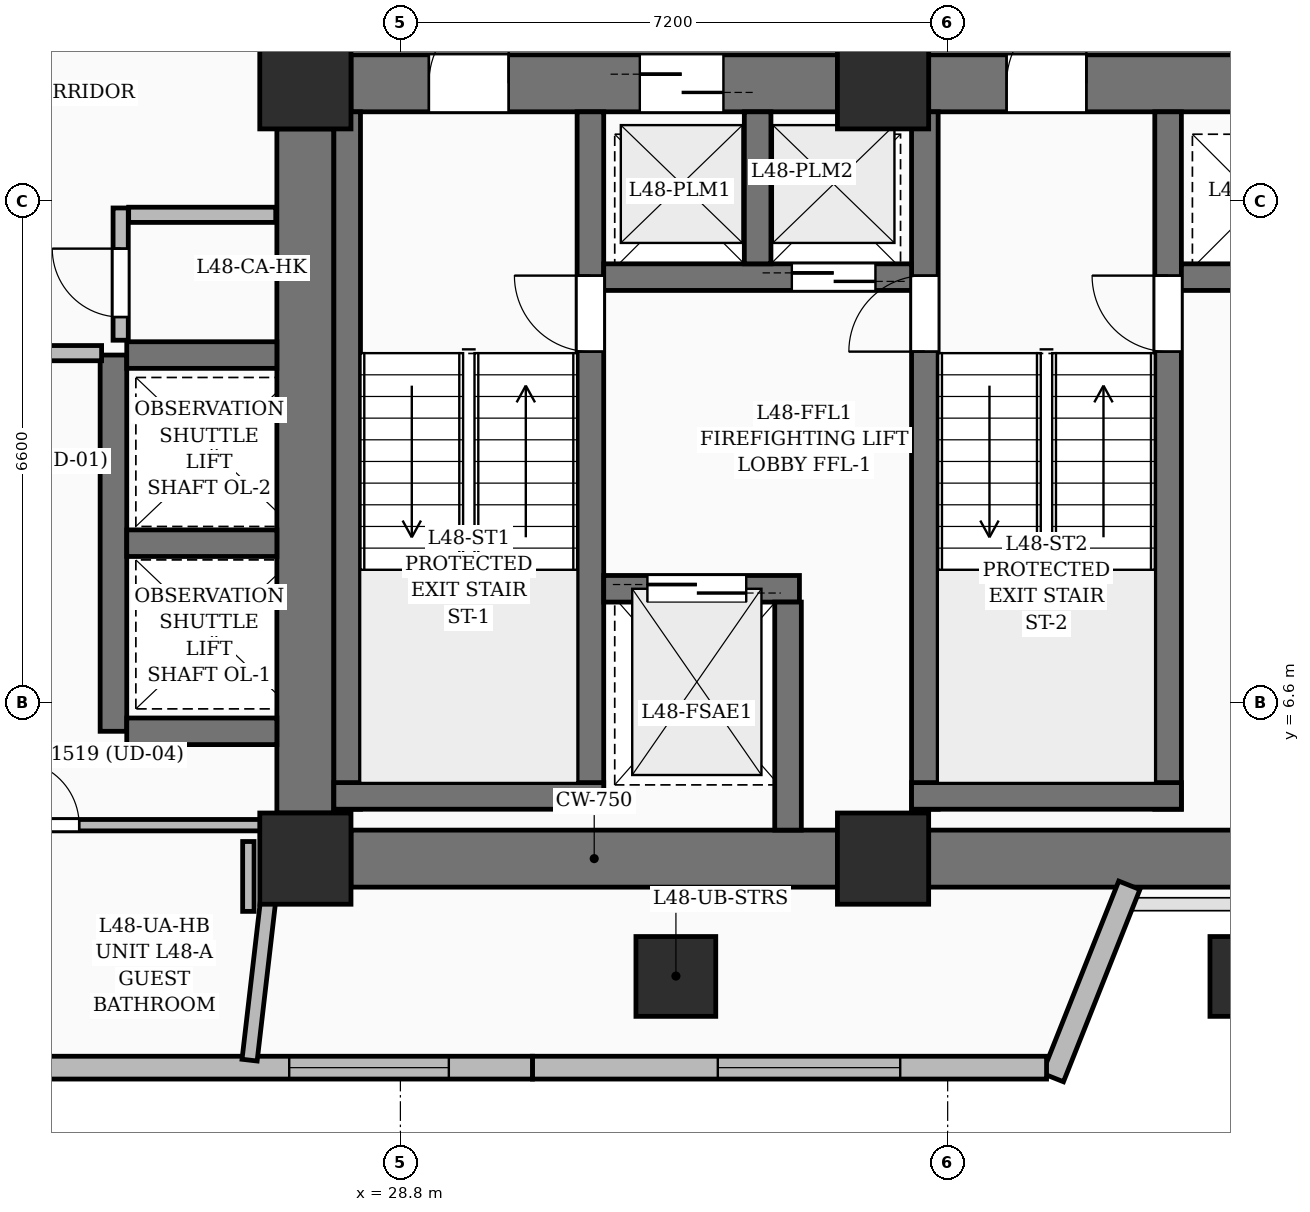
"""IFC4 building model, lengths in metres.
Left out: names, types, materials, properties, quantities, classifications, styles, units other than length and angle.
Written with IfcOpenShell. Run it as: python <this file> out.ifc"""

import sys

from ifc_helpers import new_model, si_unit, direction, frame, frame_2d, origin, origin_2d, place, context, subcontext, project, spatial, rectangle, extrude, element, fill, save


model = new_model("IFC4")
c1 = context("Model", 3, precision=1e-05, world=origin(), true_north=direction((0.0, 1.0)))
c2 = subcontext(c1, "Body", "Model", "MODEL_VIEW")
j1 = project(units=[si_unit("LENGTHUNIT", "METRE"), si_unit("PLANEANGLEUNIT", "RADIAN")], contexts=[c1])
p1 = place(None, origin())
s1 = spatial("IfcSite", under=j1, at=p1, CompositionType="ELEMENT")
p2 = place(p1, origin())
s2 = spatial("IfcBuilding", under=s1, at=p2, CompositionType="ELEMENT")
p3 = place(p2, frame((0.0, 0.0, 186.0)))
s3 = spatial("IfcBuildingStorey", under=s2, at=p3, CompositionType="ELEMENT", Elevation=186.0)
for number, where, z_axis, x_axis in (
    (1, (27.55, 4.55, 0.0), (0.0, 0.0, 1.0), (1.0, 0.0, 0.0)),
    (2, (35.15, 4.55, 0.0), (0.0, 0.0, 1.0), (1.0, 0.0, 0.0)),
    (3, (27.55, 14.75, 0.0), (0.0, 0.0, 1.0), (1.0, 0.0, 0.0)),
    (4, (35.15, 14.75, 0.0), (0.0, 0.0, 1.0), (1.0, 0.0, 0.0)),
):
    element("IfcColumn", number, at=place(p3, frame(where, z_axis=z_axis, x_axis=x_axis)), inside=s3, PredefinedType="COLUMN", context=c2, shape_type="SweptSolid", body=[
        extrude(rectangle(XDim=1.2, YDim=1.2, at=origin_2d()), origin(), (0.0, 0.0, 1.0), 3.6),
    ])
p4 = place(p3, frame((28.15, 4.55, 0.0), z_axis=(0.0, 0.0, 1.0), x_axis=(1.0, 0.0, 0.0)))
e5 = element("IfcWall", 5, at=p4, inside=s3, PredefinedType="SHEAR", context=c2, shape_type="SweptSolid", body=[
    extrude(rectangle(XDim=6.4, YDim=0.75, at=frame_2d((3.2, 0.0))), origin(), (0.0, 0.0, 1.0), 3.6),
])
p5 = place(p3, frame((35.75, 4.55, 0.0), z_axis=(0.0, 0.0, 1.0), x_axis=(1.0, 0.0, 0.0)))
e6 = element("IfcWall", 6, at=p5, inside=s3, PredefinedType="SHEAR", context=c2, shape_type="SweptSolid", body=[
    extrude(rectangle(XDim=10.7, YDim=0.75, at=frame_2d((5.35, 0.0))), origin(), (0.0, 0.0, 1.0), 3.6),
])
p6 = place(p3, frame((28.15, 14.75, 0.0), z_axis=(0.0, 0.0, 1.0), x_axis=(1.0, 0.0, 0.0)))
e7 = element("IfcWall", 7, at=p6, inside=s3, PredefinedType="SHEAR", context=c2, shape_type="SweptSolid", body=[
    extrude(rectangle(XDim=6.4, YDim=0.75, at=frame_2d((3.2, 0.0))), origin(), (0.0, 0.0, 1.0), 3.6),
])
p7 = place(p6, frame((1.025, 0.0, 0.0)))
e8 = element("IfcOpeningElement", 8, at=p7, cuts=e7, PredefinedType="OPENING", context=c2, shape_type="SweptSolid", body=[
    extrude(rectangle(XDim=1.05, YDim=2.15, at=frame_2d((0.525, 1.075))), frame((0.0, 0.385, 0.0), z_axis=(0.0, -1.0, 0.0), x_axis=(1.0, 0.0, 0.0)), (0.0, 0.0, 1.0), 0.77),
])
p8 = place(p6, frame((3.8, 0.0, 0.0)))
e9 = element("IfcOpeningElement", 9, at=p8, cuts=e7, PredefinedType="OPENING", context=c2, shape_type="SweptSolid", body=[
    extrude(rectangle(XDim=1.1, YDim=2.2, at=frame_2d((0.55, 1.1))), frame((0.0, 0.385, 0.0), z_axis=(0.0, -1.0, 0.0), x_axis=(1.0, 0.0, 0.0)), (0.0, 0.0, 1.0), 0.77),
])
p9 = place(p3, frame((35.75, 14.75, 0.0), z_axis=(0.0, 0.0, 1.0), x_axis=(1.0, 0.0, 0.0)))
e10 = element("IfcWall", 10, at=p9, inside=s3, PredefinedType="SHEAR", context=c2, shape_type="SweptSolid", body=[
    extrude(rectangle(XDim=10.7, YDim=0.75, at=frame_2d((5.35, 0.0))), origin(), (0.0, 0.0, 1.0), 3.6),
])
p10 = place(p9, frame((1.025, 0.0, 0.0)))
e11 = element("IfcOpeningElement", 11, at=p10, cuts=e10, PredefinedType="OPENING", context=c2, shape_type="SweptSolid", body=[
    extrude(rectangle(XDim=1.05, YDim=2.15, at=frame_2d((0.525, 1.075))), frame((0.0, 0.385, 0.0), z_axis=(0.0, -1.0, 0.0), x_axis=(1.0, 0.0, 0.0)), (0.0, 0.0, 1.0), 0.77),
])
p11 = place(p9, frame((8.625, 0.0, 0.0)))
e12 = element("IfcOpeningElement", 12, at=p11, cuts=e10, PredefinedType="OPENING", context=c2, shape_type="SweptSolid", body=[
    extrude(rectangle(XDim=1.05, YDim=2.15, at=frame_2d((0.525, 1.075))), frame((0.0, 0.385, 0.0), z_axis=(0.0, -1.0, 0.0), x_axis=(1.0, 0.0, 0.0)), (0.0, 0.0, 1.0), 0.77),
])
p12 = place(p3, frame((27.55, 5.15, 0.0), z_axis=(0.0, 0.0, 1.0), x_axis=(0.0, 1.0, 0.0)))
e13 = element("IfcWall", 13, at=p12, inside=s3, PredefinedType="SHEAR", context=c2, shape_type="SweptSolid", body=[
    extrude(rectangle(XDim=9.0, YDim=0.75, at=frame_2d((4.5, 0.0))), origin(), (0.0, 0.0, 1.0), 3.6),
])
p13 = place(p3, frame((28.1, 5.2, 0.0), z_axis=(0.0, 0.0, 1.0), x_axis=(0.0, 1.0, 0.0)))
e14 = element("IfcWall", 14, at=p13, inside=s3, PredefinedType="SOLIDWALL", context=c2, shape_type="SweptSolid", body=[
    extrude(rectangle(XDim=9.175, YDim=0.35, at=frame_2d((4.587, 0.0))), origin(), (0.0, 0.0, 1.0), 3.6),
])
p14 = place(p3, frame((31.3, 5.2, 0.0), z_axis=(0.0, 0.0, 1.0), x_axis=(0.0, 1.0, 0.0)))
e15 = element("IfcWall", 15, at=p14, inside=s3, PredefinedType="SOLIDWALL", context=c2, shape_type="SweptSolid", body=[
    extrude(rectangle(XDim=9.175, YDim=0.35, at=frame_2d((4.587, 0.0))), origin(), (0.0, 0.0, 1.0), 3.6),
])
p15 = place(p14, frame((6.02, 0.0, 0.0)))
e16 = element("IfcOpeningElement", 16, at=p15, cuts=e15, PredefinedType="OPENING", context=c2, shape_type="SweptSolid", body=[
    extrude(rectangle(XDim=1.0, YDim=2.15, at=frame_2d((0.5, 1.075))), frame((0.0, 0.185, 0.0), z_axis=(0.0, -1.0, 0.0), x_axis=(1.0, 0.0, 0.0)), (0.0, 0.0, 1.0), 0.37),
])
p16 = place(p3, frame((27.925, 5.375, 0.0), z_axis=(0.0, 0.0, 1.0), x_axis=(1.0, 0.0, 0.0)))
e17 = element("IfcWall", 17, at=p16, inside=s3, PredefinedType="SOLIDWALL", context=c2, shape_type="SweptSolid", body=[
    extrude(rectangle(XDim=3.55, YDim=0.35, at=frame_2d((1.775, 0.0))), origin(), (0.0, 0.0, 1.0), 3.6),
])
p17 = place(p3, frame((35.7, 5.2, 0.0), z_axis=(0.0, 0.0, 1.0), x_axis=(0.0, 1.0, 0.0)))
e18 = element("IfcWall", 18, at=p17, inside=s3, PredefinedType="SOLIDWALL", context=c2, shape_type="SweptSolid", body=[
    extrude(rectangle(XDim=9.175, YDim=0.35, at=frame_2d((4.587, 0.0))), origin(), (0.0, 0.0, 1.0), 3.6),
])
p18 = place(p17, frame((6.02, 0.0, 0.0)))
e19 = element("IfcOpeningElement", 19, at=p18, cuts=e18, PredefinedType="OPENING", context=c2, shape_type="SweptSolid", body=[
    extrude(rectangle(XDim=1.0, YDim=2.15, at=frame_2d((0.5, 1.075))), frame((0.0, 0.185, 0.0), z_axis=(0.0, -1.0, 0.0), x_axis=(1.0, 0.0, 0.0)), (0.0, 0.0, 1.0), 0.37),
])
p19 = place(p3, frame((38.9, 5.2, 0.0), z_axis=(0.0, 0.0, 1.0), x_axis=(0.0, 1.0, 0.0)))
e20 = element("IfcWall", 20, at=p19, inside=s3, PredefinedType="SOLIDWALL", context=c2, shape_type="SweptSolid", body=[
    extrude(rectangle(XDim=9.175, YDim=0.35, at=frame_2d((4.587, 0.0))), origin(), (0.0, 0.0, 1.0), 3.6),
])
p20 = place(p19, frame((6.02, 0.0, 0.0)))
e21 = element("IfcOpeningElement", 21, at=p20, cuts=e20, PredefinedType="OPENING", context=c2, shape_type="SweptSolid", body=[
    extrude(rectangle(XDim=1.0, YDim=2.15, at=frame_2d((0.5, 1.075))), frame((0.0, 0.185, 0.0), z_axis=(0.0, -1.0, 0.0), x_axis=(1.0, 0.0, 0.0)), (0.0, 0.0, 1.0), 0.37),
])
p21 = place(p3, frame((35.525, 5.375, 0.0), z_axis=(0.0, 0.0, 1.0), x_axis=(1.0, 0.0, 0.0)))
e22 = element("IfcWall", 22, at=p21, inside=s3, PredefinedType="SOLIDWALL", context=c2, shape_type="SweptSolid", body=[
    extrude(rectangle(XDim=3.55, YDim=0.35, at=frame_2d((1.775, 0.0))), origin(), (0.0, 0.0, 1.0), 3.6),
])
p22 = place(p3, frame((31.475, 8.1, 0.0), z_axis=(0.0, 0.0, 1.0), x_axis=(1.0, 0.0, 0.0)))
e23 = element("IfcWall", 23, at=p22, inside=s3, PredefinedType="SOLIDWALL", context=c2, shape_type="SweptSolid", body=[
    extrude(rectangle(XDim=2.575, YDim=0.35, at=frame_2d((1.288, 0.0))), origin(), (0.0, 0.0, 1.0), 3.6),
])
p23 = place(p22, frame((0.575, 0.0, 0.0)))
e24 = element("IfcOpeningElement", 24, at=p23, cuts=e23, PredefinedType="OPENING", context=c2, shape_type="SweptSolid", body=[
    extrude(rectangle(XDim=1.3, YDim=2.25, at=frame_2d((0.65, 1.125))), frame((0.0, 0.185, 0.0), z_axis=(0.0, -1.0, 0.0), x_axis=(1.0, 0.0, 0.0)), (0.0, 0.0, 1.0), 0.37),
])
p24 = place(p3, frame((33.9, 4.925, 0.0), z_axis=(0.0, 0.0, 1.0), x_axis=(0.0, 1.0, 0.0)))
e25 = element("IfcWall", 25, at=p24, inside=s3, PredefinedType="SOLIDWALL", context=c2, shape_type="SweptSolid", body=[
    extrude(rectangle(XDim=3.0, YDim=0.35, at=frame_2d((1.5, 0.0))), origin(), (0.0, 0.0, 1.0), 3.6),
])
p25 = place(p3, frame((31.475, 12.2, 0.0), z_axis=(0.0, 0.0, 1.0), x_axis=(1.0, 0.0, 0.0)))
e26 = element("IfcWall", 26, at=p25, inside=s3, PredefinedType="SOLIDWALL", context=c2, shape_type="SweptSolid", body=[
    extrude(rectangle(XDim=4.05, YDim=0.35, at=frame_2d((2.025, 0.0))), origin(), (0.0, 0.0, 1.0), 3.6),
])
p26 = place(p25, frame((2.475, 0.0, 0.0)))
e27 = element("IfcOpeningElement", 27, at=p26, cuts=e26, PredefinedType="OPENING", context=c2, shape_type="SweptSolid", body=[
    extrude(rectangle(XDim=1.1, YDim=2.2, at=frame_2d((0.55, 1.1))), frame((0.0, 0.185, 0.0), z_axis=(0.0, -1.0, 0.0), x_axis=(1.0, 0.0, 0.0)), (0.0, 0.0, 1.0), 0.37),
])
p27 = place(p3, frame((33.5, 12.375, 0.0), z_axis=(0.0, 0.0, 1.0), x_axis=(0.0, 1.0, 0.0)))
e28 = element("IfcWall", 28, at=p27, inside=s3, PredefinedType="SOLIDWALL", context=c2, shape_type="SweptSolid", body=[
    extrude(rectangle(XDim=2.0, YDim=0.35, at=frame_2d((1.0, 0.0))), origin(), (0.0, 0.0, 1.0), 3.6),
])
p28 = place(p3, frame((39.075, 12.2, 0.0), z_axis=(0.0, 0.0, 1.0), x_axis=(1.0, 0.0, 0.0)))
e29 = element("IfcWall", 29, at=p28, inside=s3, PredefinedType="SOLIDWALL", context=c2, shape_type="SweptSolid", body=[
    extrude(rectangle(XDim=4.05, YDim=0.35, at=frame_2d((2.025, 0.0))), origin(), (0.0, 0.0, 1.0), 3.6),
])
p29 = place(p3, frame((25.025, 6.225, 0.0), z_axis=(0.0, 0.0, 1.0), x_axis=(0.0, 1.0, 0.0)))
e30 = element("IfcWall", 30, at=p29, inside=s3, PredefinedType="SOLIDWALL", context=c2, shape_type="SweptSolid", body=[
    extrude(rectangle(XDim=4.95, YDim=0.35, at=frame_2d((2.475, 0.0))), origin(), (0.0, 0.0, 1.0), 3.6),
])
for number, where, z_axis, x_axis in (
    (31, (25.2, 6.225, 0.0), (0.0, 0.0, 1.0), (1.0, 0.0, 0.0)),
    (32, (25.2, 8.7, 0.0), (0.0, 0.0, 1.0), (1.0, 0.0, 0.0)),
    (33, (25.2, 11.175, 0.0), (0.0, 0.0, 1.0), (1.0, 0.0, 0.0)),
):
    element("IfcWall", number, at=place(p3, frame(where, z_axis=z_axis, x_axis=x_axis)), inside=s3, PredefinedType="SOLIDWALL", context=c2, shape_type="SweptSolid", body=[
        extrude(rectangle(XDim=1.975, YDim=0.35, at=frame_2d((0.988, 0.0))), origin(), (0.0, 0.0, 1.0), 3.6),
    ])
for number, where, z_axis, x_axis in (
    (34, (32.424, 3.0, 0.0), (0.0, 0.0, 1.0), (1.0, 0.0, 0.0)),
    (35, (39.976, 3.0, 0.0), (0.0, 0.0, 1.0), (1.0, 0.0, 0.0)),
):
    element("IfcColumn", number, at=place(p3, frame(where, z_axis=z_axis, x_axis=x_axis)), inside=s3, PredefinedType="COLUMN", context=c2, shape_type="SweptSolid", body=[
        extrude(rectangle(XDim=1.05, YDim=1.05, at=origin_2d()), origin(), (0.0, 0.0, 1.0), 3.6),
    ])
p30 = place(p3, frame((38.39, 4.199, 0.0), z_axis=(0.0, 0.0, 1.0), x_axis=(-0.369487569888, -0.929235672851, 0.0)))
e36 = element("IfcWall", 36, at=p30, inside=s3, PredefinedType="SOLIDWALL", context=c2, shape_type="SweptSolid", body=[
    extrude(rectangle(XDim=2.722, YDim=0.3, at=frame_2d((1.361, 0.0))), origin(), (0.0, 0.0, 1.0), 2.469),
])
p31 = place(p3, frame((37.301, 1.8, 0.0), z_axis=(0.0, 0.0, 1.0), x_axis=(-1.0, 0.0, 0.0)))
e37 = element("IfcWall", 37, at=p31, inside=s3, PredefinedType="SOLIDWALL", context=c2, shape_type="SweptSolid", body=[
    extrude(rectangle(XDim=6.764, YDim=0.3, at=frame_2d((3.382, 0.0))), origin(), (0.0, 0.0, 1.0), 3.35),
])
p32 = place(p31, frame((1.925, 0.0, 0.6)))
e38 = element("IfcOpeningElement", 38, at=p32, cuts=e37, PredefinedType="OPENING", context=c2, shape_type="SweptSolid", body=[
    extrude(rectangle(XDim=2.4, YDim=2.1, at=frame_2d((1.2, 1.05))), frame((0.0, 0.16, 0.0), z_axis=(0.0, -1.0, 0.0), x_axis=(1.0, 0.0, 0.0)), (0.0, 0.0, 1.0), 0.32),
])
p33 = place(p3, frame((30.537, 1.8, 0.0), z_axis=(0.0, 0.0, 1.0), x_axis=(-1.0, 0.0, 0.0)))
e39 = element("IfcWall", 39, at=p33, inside=s3, PredefinedType="SOLIDWALL", context=c2, shape_type="SweptSolid", body=[
    extrude(rectangle(XDim=7.039, YDim=0.3, at=frame_2d((3.519, 0.0))), origin(), (0.0, 0.0, 1.0), 3.35),
])
p34 = place(p33, frame((1.1, 0.0, 0.55)))
e40 = element("IfcOpeningElement", 40, at=p34, cuts=e39, PredefinedType="OPENING", context=c2, shape_type="SweptSolid", body=[
    extrude(rectangle(XDim=2.1, YDim=2.4, at=frame_2d((1.05, 1.2))), frame((0.0, 0.16, 0.0), z_axis=(0.0, -1.0, 0.0), x_axis=(1.0, 0.0, 0.0)), (0.0, 0.0, 1.0), 0.32),
])
p35 = place(p3, frame((25.12, 11.37, 0.0), z_axis=(0.0, 0.0, 1.0), x_axis=(0.0, 1.0, 0.0)))
e41 = element("IfcWall", 41, at=p35, inside=s3, PredefinedType="PARTITIONING", context=c2, shape_type="SweptSolid", body=[
    extrude(rectangle(XDim=1.74, YDim=0.2, at=frame_2d((0.87, 0.0))), origin(), (0.0, 0.0, 1.0), 3.35),
])
p36 = place(p35, frame((0.305, 0.0, 0.0)))
e42 = element("IfcOpeningElement", 42, at=p36, cuts=e41, PredefinedType="OPENING", context=c2, shape_type="SweptSolid", body=[
    extrude(rectangle(XDim=0.9, YDim=2.1, at=frame_2d((0.45, 1.05))), frame((0.0, 0.11, 0.0), z_axis=(0.0, -1.0, 0.0), x_axis=(1.0, 0.0, 0.0)), (0.0, 0.0, 1.0), 0.22),
])
p37 = place(p3, frame((25.225, 13.02, 0.0), z_axis=(0.0, 0.0, 1.0), x_axis=(1.0, 0.0, 0.0)))
e43 = element("IfcWall", 43, at=p37, inside=s3, PredefinedType="PARTITIONING", context=c2, shape_type="SweptSolid", body=[
    extrude(rectangle(XDim=1.935, YDim=0.2, at=frame_2d((0.967, 0.0))), origin(), (0.0, 0.0, 1.0), 3.35),
])
p38 = place(p3, frame((21.4, 11.2, 0.0), z_axis=(0.0, 0.0, 1.0), x_axis=(1.0, 0.0, 0.0)))
e44 = element("IfcWall", 44, at=p38, inside=s3, PredefinedType="PARTITIONING", context=c2, shape_type="SweptSolid", body=[
    extrude(rectangle(XDim=3.469, YDim=0.2, at=frame_2d((1.735, 0.0))), origin(), (0.0, 0.0, 1.0), 3.35),
])
p39 = place(p38, frame((1.335, 0.0, 0.0)))
e45 = element("IfcOpeningElement", 45, at=p39, cuts=e44, PredefinedType="OPENING", context=c2, shape_type="SweptSolid", body=[
    extrude(rectangle(XDim=1.0, YDim=2.2, at=frame_2d((0.5, 1.1))), frame((0.0, 0.11, 0.0), z_axis=(0.0, -1.0, 0.0), x_axis=(1.0, 0.0, 0.0)), (0.0, 0.0, 1.0), 0.22),
])
p40 = place(p3, frame((21.24, 4.99, 0.0), z_axis=(0.0, 0.0, 1.0), x_axis=(1.0, 0.0, 0.0)))
e46 = element("IfcWall", 46, at=p40, inside=s3, PredefinedType="PARTITIONING", context=c2, shape_type="SweptSolid", body=[
    extrude(rectangle(XDim=5.935, YDim=0.15, at=frame_2d((2.968, 0.0))), origin(), (0.0, 0.0, 1.0), 2.57),
])
p41 = place(p40, frame((2.484, 0.0, 0.0)))
e47 = element("IfcOpeningElement", 47, at=p41, cuts=e46, PredefinedType="OPENING", context=c2, shape_type="SweptSolid", body=[
    extrude(rectangle(XDim=0.85, YDim=2.1, at=frame_2d((0.425, 1.05))), frame((0.0, 0.085, 0.0), z_axis=(0.0, -1.0, 0.0), x_axis=(1.0, 0.0, 0.0)), (0.0, 0.0, 1.0), 0.17),
])
p42 = place(p3, frame((26.816, 1.899, 0.0), z_axis=(0.0, 0.0, 1.0), x_axis=(0.115355846157, 0.993324231436, 0.0)))
e48 = element("IfcWall", 48, at=p42, inside=s3, PredefinedType="PARTITIONING", context=c2, shape_type="SweptSolid", body=[
    extrude(rectangle(XDim=3.052, YDim=0.2, at=frame_2d((1.526, 0.0))), origin(), (0.0, 0.0, 1.0), 2.57),
])
p43 = place(p3, frame((26.8, 3.856, 0.0), z_axis=(0.0, 0.0, 1.0), x_axis=(0.0, 1.0, 0.0)))
e49 = element("IfcWall", 49, at=p43, inside=s3, PredefinedType="PARTITIONING", context=c2, shape_type="SweptSolid", body=[
    extrude(rectangle(XDim=0.919, YDim=0.15, at=frame_2d((0.459, 0.0))), origin(), (0.0, 0.0, 1.0), 2.436),
])
p44 = place(p32, origin())
e50 = element("IfcWindow", 50, at=p44, inside=s3, PartitioningType="SINGLE_PANEL", PredefinedType="WINDOW", context=c2, shape_type="SweptSolid", body=[
    extrude(rectangle(XDim=2.4, YDim=2.1, at=frame_2d((1.2, 1.05))), frame((0.0, 0.03, 0.0), z_axis=(0.0, -1.0, 0.0), x_axis=(1.0, 0.0, 0.0)), (0.0, 0.0, 1.0), 0.06),
])
fill(e38, e50)
p45 = place(p34, origin())
e51 = element("IfcWindow", 51, at=p45, inside=s3, PartitioningType="SINGLE_PANEL", PredefinedType="WINDOW", context=c2, shape_type="SweptSolid", body=[
    extrude(rectangle(XDim=2.1, YDim=2.4, at=frame_2d((1.05, 1.2))), frame((0.0, 0.03, 0.0), z_axis=(0.0, -1.0, 0.0), x_axis=(1.0, 0.0, 0.0)), (0.0, 0.0, 1.0), 0.06),
])
fill(e40, e51)
p46 = place(p7, origin())
e52 = element("IfcDoor", 52, at=p46, inside=s3, OperationType="SINGLE_SWING_RIGHT", PredefinedType="DOOR", context=c2, shape_type="SweptSolid", body=[
    extrude(rectangle(XDim=1.05, YDim=2.15, at=frame_2d((0.525, 1.075))), frame((0.0, 0.025, 0.0), z_axis=(0.0, -1.0, 0.0), x_axis=(1.0, 0.0, 0.0)), (0.0, 0.0, 1.0), 0.05),
])
fill(e8, e52)
p47 = place(p10, origin())
e53 = element("IfcDoor", 53, at=p47, inside=s3, OperationType="SINGLE_SWING_RIGHT", PredefinedType="DOOR", context=c2, shape_type="SweptSolid", body=[
    extrude(rectangle(XDim=1.05, YDim=2.15, at=frame_2d((0.525, 1.075))), frame((0.0, 0.025, 0.0), z_axis=(0.0, -1.0, 0.0), x_axis=(1.0, 0.0, 0.0)), (0.0, 0.0, 1.0), 0.05),
])
fill(e11, e53)
p48 = place(p15, origin())
e54 = element("IfcDoor", 54, at=p48, inside=s3, OperationType="SINGLE_SWING_RIGHT", PredefinedType="DOOR", context=c2, shape_type="SweptSolid", body=[
    extrude(rectangle(XDim=1.0, YDim=2.15, at=frame_2d((0.5, 1.075))), frame((0.0, 0.025, 0.0), z_axis=(0.0, -1.0, 0.0), x_axis=(1.0, 0.0, 0.0)), (0.0, 0.0, 1.0), 0.05),
])
fill(e16, e54)
p49 = place(p18, origin())
e55 = element("IfcDoor", 55, at=p49, inside=s3, OperationType="SINGLE_SWING_LEFT", PredefinedType="DOOR", context=c2, shape_type="SweptSolid", body=[
    extrude(rectangle(XDim=1.0, YDim=2.15, at=frame_2d((0.5, 1.075))), frame((0.0, 0.025, 0.0), z_axis=(0.0, -1.0, 0.0), x_axis=(1.0, 0.0, 0.0)), (0.0, 0.0, 1.0), 0.05),
])
fill(e19, e55)
p50 = place(p20, origin())
e56 = element("IfcDoor", 56, at=p50, inside=s3, OperationType="SINGLE_SWING_RIGHT", PredefinedType="DOOR", context=c2, shape_type="SweptSolid", body=[
    extrude(rectangle(XDim=1.0, YDim=2.15, at=frame_2d((0.5, 1.075))), frame((0.0, 0.025, 0.0), z_axis=(0.0, -1.0, 0.0), x_axis=(1.0, 0.0, 0.0)), (0.0, 0.0, 1.0), 0.05),
])
fill(e21, e56)
p51 = place(p23, origin())
e57 = element("IfcDoor", 57, at=p51, inside=s3, OperationType="DOUBLE_DOOR_SLIDING", PredefinedType="DOOR", context=c2, shape_type="SweptSolid", body=[
    extrude(rectangle(XDim=1.3, YDim=2.25, at=frame_2d((0.65, 1.125))), frame((0.0, 0.025, 0.0), z_axis=(0.0, -1.0, 0.0), x_axis=(1.0, 0.0, 0.0)), (0.0, 0.0, 1.0), 0.05),
])
fill(e24, e57)
p52 = place(p8, origin())
e58 = element("IfcDoor", 58, at=p52, inside=s3, OperationType="DOUBLE_DOOR_SLIDING", PredefinedType="DOOR", context=c2, shape_type="SweptSolid", body=[
    extrude(rectangle(XDim=1.1, YDim=2.2, at=frame_2d((0.55, 1.1))), frame((0.0, 0.025, 0.0), z_axis=(0.0, -1.0, 0.0), x_axis=(1.0, 0.0, 0.0)), (0.0, 0.0, 1.0), 0.05),
])
fill(e9, e58)
p53 = place(p26, origin())
e59 = element("IfcDoor", 59, at=p53, inside=s3, OperationType="DOUBLE_DOOR_SLIDING", PredefinedType="DOOR", context=c2, shape_type="SweptSolid", body=[
    extrude(rectangle(XDim=1.1, YDim=2.2, at=frame_2d((0.55, 1.1))), frame((0.0, 0.025, 0.0), z_axis=(0.0, -1.0, 0.0), x_axis=(1.0, 0.0, 0.0)), (0.0, 0.0, 1.0), 0.05),
])
fill(e27, e59)
p54 = place(p36, origin())
e60 = element("IfcDoor", 60, at=p54, inside=s3, OperationType="SINGLE_SWING_RIGHT", PredefinedType="DOOR", context=c2, shape_type="SweptSolid", body=[
    extrude(rectangle(XDim=0.9, YDim=2.1, at=frame_2d((0.45, 1.05))), frame((0.0, 0.025, 0.0), z_axis=(0.0, -1.0, 0.0), x_axis=(1.0, 0.0, 0.0)), (0.0, 0.0, 1.0), 0.05),
])
fill(e42, e60)
p55 = place(p41, origin())
e61 = element("IfcDoor", 61, at=p55, inside=s3, OperationType="SINGLE_SWING_LEFT", PredefinedType="DOOR", context=c2, shape_type="SweptSolid", body=[
    extrude(rectangle(XDim=0.85, YDim=2.1, at=frame_2d((0.425, 1.05))), frame((0.0, 0.025, 0.0), z_axis=(0.0, -1.0, 0.0), x_axis=(1.0, 0.0, 0.0)), (0.0, 0.0, 1.0), 0.05),
])
fill(e47, e61)
save(model, sys.argv[1])
